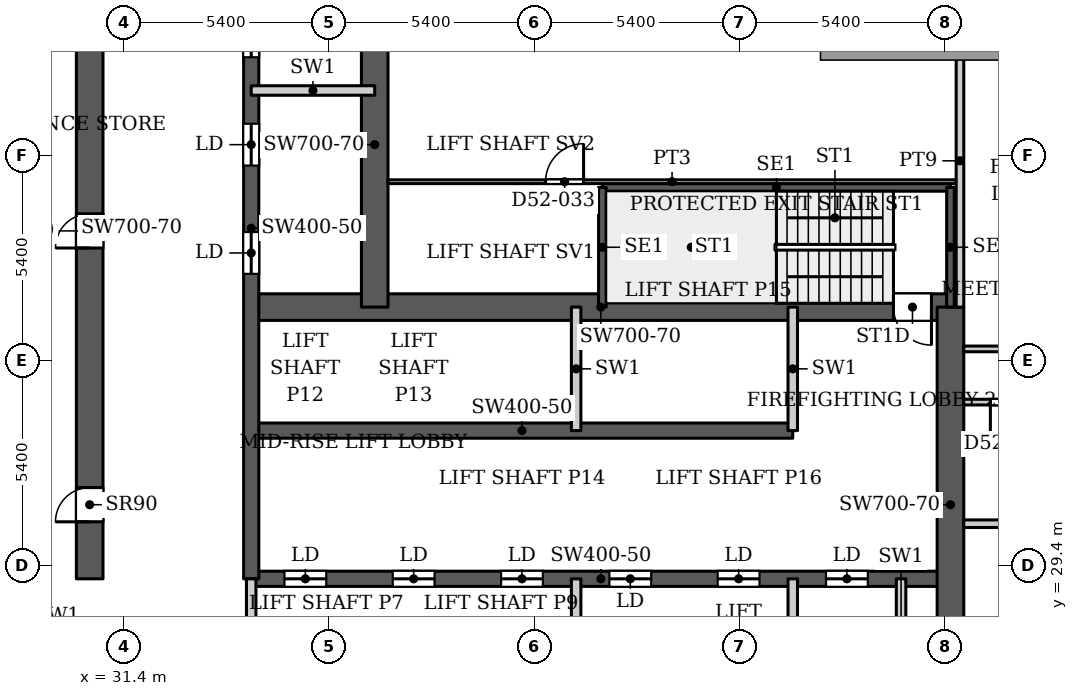
"""IFC4 building model, lengths in metres.
Left out: names, types, materials, properties, quantities, classifications, styles, units other than length and angle.
Written with IfcOpenShell. Run it as: python <this file> out.ifc"""

import sys

from ifc_helpers import new_model, si_unit, direction, frame, frame_2d, origin, place, context, subcontext, project, spatial, rectangle, extrude, source, transform, mapped, element, fill, save


model = new_model("IFC4")
c1 = context("Model", 3, precision=1e-05, world=origin(), true_north=direction((0.0, 1.0)))
c2 = subcontext(c1, "Body", "Model", "MODEL_VIEW")
j1 = project(units=[si_unit("LENGTHUNIT", "METRE"), si_unit("PLANEANGLEUNIT", "RADIAN")], contexts=[c1])
p1 = place(None, origin())
s1 = spatial("IfcSite", under=j1, at=p1, CompositionType="ELEMENT")
p2 = place(p1, origin())
s2 = spatial("IfcBuilding", under=s1, at=p2, CompositionType="ELEMENT")
p3 = place(p2, frame((0.0, 0.0, 227.9)))
s3 = spatial("IfcBuildingStorey", under=s2, at=p3, CompositionType="ELEMENT", Elevation=227.9)
p4 = place(p3, frame((34.75, 29.05, 0.0), z_axis=(0.0, 0.0, 1.0), x_axis=(1.0, 0.0, 0.0)))
e1 = element("IfcWall", 1, at=p4, inside=s3, PredefinedType="SHEAR", context=c2, shape_type="SweptSolid", body=[
    extrude(rectangle(XDim=18.4, YDim=0.4, at=frame_2d((9.2, 0.0))), origin(), (0.0, 0.0, 1.0), 3.9),
])
p5 = place(p4, frame((0.875, 0.0, 0.0)))
e2 = element("IfcOpeningElement", 2, at=p5, cuts=e1, PredefinedType="OPENING", context=c2, shape_type="SweptSolid", body=[
    extrude(rectangle(XDim=1.1, YDim=2.2, at=frame_2d((0.55, 1.1))), frame((0.0, 0.21, 0.0), z_axis=(0.0, -1.0, 0.0), x_axis=(1.0, 0.0, 0.0)), (0.0, 0.0, 1.0), 0.42),
])
p6 = place(p4, frame((3.725, 0.0, 0.0)))
e3 = element("IfcOpeningElement", 3, at=p6, cuts=e1, PredefinedType="OPENING", context=c2, shape_type="SweptSolid", body=[
    extrude(rectangle(XDim=1.1, YDim=2.2, at=frame_2d((0.55, 1.1))), frame((0.0, 0.21, 0.0), z_axis=(0.0, -1.0, 0.0), x_axis=(1.0, 0.0, 0.0)), (0.0, 0.0, 1.0), 0.42),
])
p7 = place(p4, frame((6.575, 0.0, 0.0)))
e4 = element("IfcOpeningElement", 4, at=p7, cuts=e1, PredefinedType="OPENING", context=c2, shape_type="SweptSolid", body=[
    extrude(rectangle(XDim=1.1, YDim=2.2, at=frame_2d((0.55, 1.1))), frame((0.0, 0.21, 0.0), z_axis=(0.0, -1.0, 0.0), x_axis=(1.0, 0.0, 0.0)), (0.0, 0.0, 1.0), 0.42),
])
p8 = place(p4, frame((9.425, 0.0, 0.0)))
e5 = element("IfcOpeningElement", 5, at=p8, cuts=e1, PredefinedType="OPENING", context=c2, shape_type="SweptSolid", body=[
    extrude(rectangle(XDim=1.1, YDim=2.2, at=frame_2d((0.55, 1.1))), frame((0.0, 0.21, 0.0), z_axis=(0.0, -1.0, 0.0), x_axis=(1.0, 0.0, 0.0)), (0.0, 0.0, 1.0), 0.42),
])
p9 = place(p4, frame((12.275, 0.0, 0.0)))
e6 = element("IfcOpeningElement", 6, at=p9, cuts=e1, PredefinedType="OPENING", context=c2, shape_type="SweptSolid", body=[
    extrude(rectangle(XDim=1.1, YDim=2.2, at=frame_2d((0.55, 1.1))), frame((0.0, 0.21, 0.0), z_axis=(0.0, -1.0, 0.0), x_axis=(1.0, 0.0, 0.0)), (0.0, 0.0, 1.0), 0.42),
])
p10 = place(p4, frame((15.125, 0.0, 0.0)))
e7 = element("IfcOpeningElement", 7, at=p10, cuts=e1, PredefinedType="OPENING", context=c2, shape_type="SweptSolid", body=[
    extrude(rectangle(XDim=1.1, YDim=2.2, at=frame_2d((0.55, 1.1))), frame((0.0, 0.21, 0.0), z_axis=(0.0, -1.0, 0.0), x_axis=(1.0, 0.0, 0.0)), (0.0, 0.0, 1.0), 0.42),
])
p11 = place(p3, frame((34.75, 32.95, 0.0), z_axis=(0.0, 0.0, 1.0), x_axis=(1.0, 0.0, 0.0)))
e8 = element("IfcWall", 8, at=p11, inside=s3, PredefinedType="SHEAR", context=c2, shape_type="SweptSolid", body=[
    extrude(rectangle(XDim=14.25, YDim=0.4, at=frame_2d((7.125, 0.0))), origin(), (0.0, 0.0, 1.0), 3.9),
])
p12 = place(p3, frame((34.75, 36.2, 0.0), z_axis=(0.0, 0.0, 1.0), x_axis=(1.0, 0.0, 0.0)))
e9 = element("IfcWall", 9, at=p12, inside=s3, PredefinedType="SHEAR", context=c2, shape_type="SweptSolid", body=[
    extrude(rectangle(XDim=18.4, YDim=0.7, at=frame_2d((9.2, 0.0))), origin(), (0.0, 0.0, 1.0), 3.9),
])
p13 = place(p12, frame((16.9, 0.0, 0.0)))
e10 = element("IfcOpeningElement", 10, at=p13, cuts=e9, PredefinedType="OPENING", context=c2, shape_type="SweptSolid", body=[
    extrude(rectangle(XDim=1.0, YDim=2.2, at=frame_2d((0.5, 1.1))), frame((0.0, 0.36, 0.0), z_axis=(0.0, -1.0, 0.0), x_axis=(1.0, 0.0, 0.0)), (0.0, 0.0, 1.0), 0.72),
])
p14 = place(p3, frame((34.75, 29.05, 0.0), z_axis=(0.0, 0.0, 1.0), x_axis=(0.0, 1.0, 0.0)))
e11 = element("IfcWall", 11, at=p14, inside=s3, PredefinedType="SHEAR", context=c2, shape_type="SweptSolid", body=[
    extrude(rectangle(XDim=18.45, YDim=0.4, at=frame_2d((9.225, 0.0))), origin(), (0.0, 0.0, 1.0), 3.9),
])
p15 = place(p14, frame((8.025, 0.0, 0.0)))
e12 = element("IfcOpeningElement", 12, at=p15, cuts=e11, PredefinedType="OPENING", context=c2, shape_type="SweptSolid", body=[
    extrude(rectangle(XDim=1.1, YDim=2.2, at=frame_2d((0.55, 1.1))), frame((0.0, 0.21, 0.0), z_axis=(0.0, -1.0, 0.0), x_axis=(1.0, 0.0, 0.0)), (0.0, 0.0, 1.0), 0.42),
])
p16 = place(p14, frame((10.875, 0.0, 0.0)))
e13 = element("IfcOpeningElement", 13, at=p16, cuts=e11, PredefinedType="OPENING", context=c2, shape_type="SweptSolid", body=[
    extrude(rectangle(XDim=1.1, YDim=2.2, at=frame_2d((0.55, 1.1))), frame((0.0, 0.21, 0.0), z_axis=(0.0, -1.0, 0.0), x_axis=(1.0, 0.0, 0.0)), (0.0, 0.0, 1.0), 0.42),
])
p17 = place(p14, frame((13.725, 0.0, 0.0)))
e14 = element("IfcOpeningElement", 14, at=p17, cuts=e11, PredefinedType="OPENING", context=c2, shape_type="SweptSolid", body=[
    extrude(rectangle(XDim=1.1, YDim=2.2, at=frame_2d((0.55, 1.1))), frame((0.0, 0.21, 0.0), z_axis=(0.0, -1.0, 0.0), x_axis=(1.0, 0.0, 0.0)), (0.0, 0.0, 1.0), 0.42),
])
p18 = place(p14, frame((15.95, 0.0, 0.0)))
e15 = element("IfcOpeningElement", 15, at=p18, cuts=e11, PredefinedType="OPENING", context=c2, shape_type="SweptSolid", body=[
    extrude(rectangle(XDim=1.1, YDim=2.2, at=frame_2d((0.55, 1.1))), frame((0.0, 0.21, 0.0), z_axis=(0.0, -1.0, 0.0), x_axis=(1.0, 0.0, 0.0)), (0.0, 0.0, 1.0), 0.42),
])
p19 = place(p3, frame((38.0, 36.2, 0.0), z_axis=(0.0, 0.0, 1.0), x_axis=(0.0, 1.0, 0.0)))
e16 = element("IfcWall", 16, at=p19, inside=s3, PredefinedType="SHEAR", context=c2, shape_type="SweptSolid", body=[
    extrude(rectangle(XDim=8.55, YDim=0.7, at=frame_2d((4.275, 0.0))), origin(), (0.0, 0.0, 1.0), 3.9),
])
p20 = place(p3, frame((30.5, 29.05, 0.0), z_axis=(0.0, 0.0, 1.0), x_axis=(0.0, 1.0, 0.0)))
e17 = element("IfcWall", 17, at=p20, inside=s3, PredefinedType="SHEAR", context=c2, shape_type="SweptSolid", body=[
    extrude(rectangle(XDim=18.45, YDim=0.7, at=frame_2d((9.225, 0.0))), origin(), (0.0, 0.0, 1.0), 3.9),
])
p21 = place(p20, frame((1.5, 0.0, 0.0)))
e18 = element("IfcOpeningElement", 18, at=p21, cuts=e17, PredefinedType="OPENING", context=c2, shape_type="SweptSolid", body=[
    extrude(rectangle(XDim=0.9, YDim=2.2, at=frame_2d((0.45, 1.1))), frame((0.0, 0.36, 0.0), z_axis=(0.0, -1.0, 0.0), x_axis=(1.0, 0.0, 0.0)), (0.0, 0.0, 1.0), 0.72),
])
p22 = place(p20, frame((8.705, 0.0, 0.0)))
e19 = element("IfcOpeningElement", 19, at=p22, cuts=e17, PredefinedType="OPENING", context=c2, shape_type="SweptSolid", body=[
    extrude(rectangle(XDim=0.9, YDim=2.2, at=frame_2d((0.45, 1.1))), frame((0.0, 0.36, 0.0), z_axis=(0.0, -1.0, 0.0), x_axis=(1.0, 0.0, 0.0)), (0.0, 0.0, 1.0), 0.72),
])
p23 = place(p3, frame((53.15, 25.8, 0.0), z_axis=(0.0, 0.0, 1.0), x_axis=(0.0, 1.0, 0.0)))
e20 = element("IfcWall", 20, at=p23, inside=s3, PredefinedType="SHEAR", context=c2, shape_type="SweptSolid", body=[
    extrude(rectangle(XDim=10.4, YDim=0.7, at=frame_2d((5.2, 0.0))), origin(), (0.0, 0.0, 1.0), 3.9),
])
p24 = place(p3, frame((29.712, 26.072, 0.0), z_axis=(0.0, 0.0, 1.0), x_axis=(-0.511028049012, 0.859564036662, 0.0)))
e21 = element("IfcWall", 21, at=p24, inside=s3, PredefinedType="SOLIDWALL", context=c2, shape_type="SweptSolid", body=[
    extrude(rectangle(XDim=4.634, YDim=0.25, at=frame_2d((2.317, 0.0))), origin(), (0.0, 0.0, 1.0), 3.217),
])
p25 = place(p3, frame((27.195, 31.969, 0.0), z_axis=(0.0, 0.0, 1.0), x_axis=(0.052555284099, 0.998618016117, 0.0)))
e22 = element("IfcWall", 22, at=p25, inside=s3, PredefinedType="SOLIDWALL", context=c2, shape_type="SweptSolid", body=[
    extrude(rectangle(XDim=61.38, YDim=0.25, at=frame_2d((30.69, 0.0))), origin(), (0.0, 0.0, 1.0), 3.75),
])
p26 = place(p3, frame((43.99, 39.35, 0.0), z_axis=(0.0, 0.0, 1.0), x_axis=(1.0, 0.0, 0.0)))
e23 = element("IfcWall", 23, at=p26, inside=s3, PredefinedType="SHEAR", context=c2, shape_type="SweptSolid", body=[
    extrude(rectangle(XDim=9.16, YDim=0.2, at=frame_2d((4.58, 0.0))), origin(), (0.0, 0.0, 1.0), 3.9),
])
for number, where, z_axis, x_axis in (
    (24, (43.99, 36.2, 0.0), (0.0, 0.0, 1.0), (0.0, 1.0, 0.0)),
    (25, (53.15, 36.2, 0.0), (0.0, 0.0, 1.0), (0.0, 1.0, 0.0)),
):
    element("IfcWall", number, at=place(p3, frame(where, z_axis=z_axis, x_axis=x_axis)), inside=s3, PredefinedType="SHEAR", context=c2, shape_type="SweptSolid", body=[
        extrude(rectangle(XDim=3.15, YDim=0.2, at=frame_2d((1.575, 0.0))), origin(), (0.0, 0.0, 1.0), 3.9),
    ])
for number, where, z_axis, x_axis in (
    (26, (34.75, 25.8, 0.0), (0.0, 0.0, 1.0), (0.0, 1.0, 0.0)),
    (27, (43.3, 25.8, 0.0), (0.0, 0.0, 1.0), (0.0, 1.0, 0.0)),
    (28, (43.3, 32.95, 0.0), (0.0, 0.0, 1.0), (0.0, 1.0, 0.0)),
    (29, (49.0, 25.8, 0.0), (0.0, 0.0, 1.0), (0.0, 1.0, 0.0)),
    (30, (49.0, 32.95, 0.0), (0.0, 0.0, 1.0), (0.0, 1.0, 0.0)),
    (31, (51.85, 25.8, 0.0), (0.0, 0.0, 1.0), (0.0, 1.0, 0.0)),
    (32, (34.75, 41.9, 0.0), (0.0, 0.0, 1.0), (1.0, 0.0, 0.0)),
):
    element("IfcWall", number, at=place(p3, frame(where, z_axis=z_axis, x_axis=x_axis)), inside=s3, PredefinedType="PARTITIONING", context=c2, shape_type="SweptSolid", body=[
        extrude(rectangle(XDim=3.25, YDim=0.25, at=frame_2d((1.625, 0.0))), origin(), (0.0, 0.0, 1.0), 3.9),
    ])
p27 = place(p3, frame((38.349, 39.5, 0.0), z_axis=(0.0, 0.0, 1.0), x_axis=(1.0, 0.0, 0.0)))
e33 = element("IfcWall", 33, at=p27, inside=s3, PredefinedType="PARTITIONING", context=c2, shape_type="SweptSolid", body=[
    extrude(rectangle(XDim=14.951, YDim=0.1, at=frame_2d((7.476, 0.0))), origin(), (0.0, 0.0, 1.0), 3.6),
])
p28 = place(p27, frame((4.147, 0.0, 0.0)))
e34 = element("IfcOpeningElement", 34, at=p28, cuts=e33, PredefinedType="OPENING", context=c2, shape_type="SweptSolid", body=[
    extrude(rectangle(XDim=1.0, YDim=2.1, at=frame_2d((0.5, 1.05))), frame((0.0, 0.06, 0.0), z_axis=(0.0, -1.0, 0.0), x_axis=(1.0, 0.0, 0.0)), (0.0, 0.0, 1.0), 0.12),
])
p29 = place(p3, frame((53.4, 36.199, 0.0), z_axis=(0.0, 0.0, 1.0), x_axis=(0.0, 1.0, 0.0)))
e35 = element("IfcWall", 35, at=p29, inside=s3, PredefinedType="PARTITIONING", context=c2, shape_type="SweptSolid", body=[
    extrude(rectangle(XDim=7.701, YDim=0.2, at=frame_2d((3.851, 0.0))), origin(), (0.0, 0.0, 1.0), 3.6),
])
p30 = place(p3, frame((53.499, 30.5, 0.0), z_axis=(0.0, 0.0, 1.0), x_axis=(1.0, 0.0, 0.0)))
e36 = element("IfcWall", 36, at=p30, inside=s3, PredefinedType="PARTITIONING", context=c2, shape_type="SweptSolid", body=[
    extrude(rectangle(XDim=28.401, YDim=0.2, at=frame_2d((14.2, 0.0))), origin(), (0.0, 0.0, 1.0), 3.6),
])
p31 = place(p30, frame((17.701, 0.0, 0.0)))
e37 = element("IfcOpeningElement", 37, at=p31, cuts=e36, PredefinedType="OPENING", context=c2, shape_type="SweptSolid", body=[
    extrude(rectangle(XDim=1.0, YDim=2.1, at=frame_2d((0.5, 1.05))), frame((0.0, 0.11, 0.0), z_axis=(0.0, -1.0, 0.0), x_axis=(1.0, 0.0, 0.0)), (0.0, 0.0, 1.0), 0.22),
])
p32 = place(p30, frame((24.301, 0.0, 0.0)))
e38 = element("IfcOpeningElement", 38, at=p32, cuts=e36, PredefinedType="OPENING", context=c2, shape_type="SweptSolid", body=[
    extrude(rectangle(XDim=1.0, YDim=2.1, at=frame_2d((0.5, 1.05))), frame((0.0, 0.11, 0.0), z_axis=(0.0, -1.0, 0.0), x_axis=(1.0, 0.0, 0.0)), (0.0, 0.0, 1.0), 0.22),
])
p33 = place(p3, frame((53.499, 33.7, 0.0), z_axis=(0.0, 0.0, 1.0), x_axis=(1.0, 0.0, 0.0)))
e39 = element("IfcWall", 39, at=p33, inside=s3, PredefinedType="PARTITIONING", context=c2, shape_type="SweptSolid", body=[
    extrude(rectangle(XDim=17.076, YDim=0.15, at=frame_2d((8.538, 0.0))), origin(), (0.0, 0.0, 1.0), 3.6),
])
p34 = place(p33, frame((10.151, 0.0, 0.0)))
e40 = element("IfcOpeningElement", 40, at=p34, cuts=e39, PredefinedType="OPENING", context=c2, shape_type="SweptSolid", body=[
    extrude(rectangle(XDim=0.8, YDim=2.1, at=frame_2d((0.4, 1.05))), frame((0.0, 0.085, 0.0), z_axis=(0.0, -1.0, 0.0), x_axis=(1.0, 0.0, 0.0)), (0.0, 0.0, 1.0), 0.17),
])
p35 = place(p33, frame((14.651, 0.0, 0.0)))
e41 = element("IfcOpeningElement", 41, at=p35, cuts=e39, PredefinedType="OPENING", context=c2, shape_type="SweptSolid", body=[
    extrude(rectangle(XDim=0.8, YDim=2.1, at=frame_2d((0.4, 1.05))), frame((0.0, 0.085, 0.0), z_axis=(0.0, -1.0, 0.0), x_axis=(1.0, 0.0, 0.0)), (0.0, 0.0, 1.0), 0.17),
])
p36 = place(p33, frame((7.451, 0.0, 0.0)))
e42 = element("IfcOpeningElement", 42, at=p36, cuts=e39, PredefinedType="OPENING", context=c2, shape_type="SweptSolid", body=[
    extrude(rectangle(XDim=0.8, YDim=2.1, at=frame_2d((0.4, 1.05))), frame((0.0, 0.085, 0.0), z_axis=(0.0, -1.0, 0.0), x_axis=(1.0, 0.0, 0.0)), (0.0, 0.0, 1.0), 0.17),
])
p37 = place(p33, frame((3.851, 0.0, 0.0)))
e43 = element("IfcOpeningElement", 43, at=p37, cuts=e39, PredefinedType="OPENING", context=c2, shape_type="SweptSolid", body=[
    extrude(rectangle(XDim=0.9, YDim=2.1, at=frame_2d((0.45, 1.05))), frame((0.0, 0.085, 0.0), z_axis=(0.0, -1.0, 0.0), x_axis=(1.0, 0.0, 0.0)), (0.0, 0.0, 1.0), 0.17),
])
p38 = place(p33, frame((0.701, 0.0, 0.0)))
e44 = element("IfcOpeningElement", 44, at=p38, cuts=e39, PredefinedType="OPENING", context=c2, shape_type="SweptSolid", body=[
    extrude(rectangle(XDim=0.8, YDim=2.1, at=frame_2d((0.4, 1.05))), frame((0.0, 0.085, 0.0), z_axis=(0.0, -1.0, 0.0), x_axis=(1.0, 0.0, 0.0)), (0.0, 0.0, 1.0), 0.17),
])
p39 = place(p33, frame((12.701, 0.0, 0.0)))
e45 = element("IfcOpeningElement", 45, at=p39, cuts=e39, PredefinedType="OPENING", context=c2, shape_type="SweptSolid", body=[
    extrude(rectangle(XDim=0.8, YDim=2.1, at=frame_2d((0.4, 1.05))), frame((0.0, 0.085, 0.0), z_axis=(0.0, -1.0, 0.0), x_axis=(1.0, 0.0, 0.0)), (0.0, 0.0, 1.0), 0.17),
])
p40 = place(p3, frame((53.499, 35.1, 0.0), z_axis=(0.0, 0.0, 1.0), x_axis=(1.0, 0.0, 0.0)))
e46 = element("IfcWall", 46, at=p40, inside=s3, PredefinedType="PARTITIONING", context=c2, shape_type="SweptSolid", body=[
    extrude(rectangle(XDim=19.901, YDim=0.15, at=frame_2d((9.95, 0.0))), origin(), (0.0, 0.0, 1.0), 3.6),
])
p41 = place(p40, frame((8.451, 0.0, 0.0)))
e47 = element("IfcOpeningElement", 47, at=p41, cuts=e46, PredefinedType="OPENING", context=c2, shape_type="SweptSolid", body=[
    extrude(rectangle(XDim=0.9, YDim=2.1, at=frame_2d((0.45, 1.05))), frame((0.0, 0.085, 0.0), z_axis=(0.0, -1.0, 0.0), x_axis=(1.0, 0.0, 0.0)), (0.0, 0.0, 1.0), 0.17),
])
p42 = place(p40, frame((11.601, 0.0, 0.0)))
e48 = element("IfcOpeningElement", 48, at=p42, cuts=e46, PredefinedType="OPENING", context=c2, shape_type="SweptSolid", body=[
    extrude(rectangle(XDim=0.9, YDim=2.1, at=frame_2d((0.45, 1.05))), frame((0.0, 0.085, 0.0), z_axis=(0.0, -1.0, 0.0), x_axis=(1.0, 0.0, 0.0)), (0.0, 0.0, 1.0), 0.17),
])
p43 = place(p40, frame((1.701, 0.0, 0.0)))
e49 = element("IfcOpeningElement", 49, at=p43, cuts=e46, PredefinedType="OPENING", context=c2, shape_type="SweptSolid", body=[
    extrude(rectangle(XDim=1.0, YDim=2.1, at=frame_2d((0.5, 1.05))), frame((0.0, 0.085, 0.0), z_axis=(0.0, -1.0, 0.0), x_axis=(1.0, 0.0, 0.0)), (0.0, 0.0, 1.0), 0.17),
])
p44 = place(p40, frame((4.801, 0.0, 0.0)))
e50 = element("IfcOpeningElement", 50, at=p44, cuts=e46, PredefinedType="OPENING", context=c2, shape_type="SweptSolid", body=[
    extrude(rectangle(XDim=1.6, YDim=2.1, at=frame_2d((0.8, 1.05))), frame((0.0, 0.085, 0.0), z_axis=(0.0, -1.0, 0.0), x_axis=(1.0, 0.0, 0.0)), (0.0, 0.0, 1.0), 0.17),
])
p45 = place(p40, frame((15.701, 0.0, 0.0)))
e51 = element("IfcOpeningElement", 51, at=p45, cuts=e46, PredefinedType="OPENING", context=c2, shape_type="SweptSolid", body=[
    extrude(rectangle(XDim=0.9, YDim=2.1, at=frame_2d((0.45, 1.05))), frame((0.0, 0.085, 0.0), z_axis=(0.0, -1.0, 0.0), x_axis=(1.0, 0.0, 0.0)), (0.0, 0.0, 1.0), 0.17),
])
m1 = source(origin(), c2, "Body", "SweptSolid", [
    extrude(rectangle(XDim=1.1, YDim=2.2, at=frame_2d((0.55, 1.1))), frame((0.0, 0.025, 0.0), z_axis=(0.0, -1.0, 0.0), x_axis=(1.0, 0.0, 0.0)), (0.0, 0.0, 1.0), 0.05),
])
p46 = place(p5, origin())
e52 = element("IfcDoor", 52, at=p46, inside=s3, OperationType="SLIDING_TO_LEFT", PredefinedType="DOOR", context=c2, shape_type="MappedRepresentation", body=[
    mapped(m1, transform((0.0, 0.0, 0.0), x_axis=(1.0, 0.0, 0.0), y_axis=(0.0, 1.0, 0.0), z_axis=(0.0, 0.0, 1.0), scale=1.0)),
])
fill(e2, e52)
p47 = place(p6, origin())
e53 = element("IfcDoor", 53, at=p47, inside=s3, OperationType="SLIDING_TO_LEFT", PredefinedType="DOOR", context=c2, shape_type="MappedRepresentation", body=[
    mapped(m1, transform((0.0, 0.0, 0.0), x_axis=(1.0, 0.0, 0.0), y_axis=(0.0, 1.0, 0.0), z_axis=(0.0, 0.0, 1.0), scale=1.0)),
])
fill(e3, e53)
p48 = place(p7, origin())
e54 = element("IfcDoor", 54, at=p48, inside=s3, OperationType="SLIDING_TO_LEFT", PredefinedType="DOOR", context=c2, shape_type="MappedRepresentation", body=[
    mapped(m1, transform((0.0, 0.0, 0.0), x_axis=(1.0, 0.0, 0.0), y_axis=(0.0, 1.0, 0.0), z_axis=(0.0, 0.0, 1.0), scale=1.0)),
])
fill(e4, e54)
p49 = place(p8, origin())
e55 = element("IfcDoor", 55, at=p49, inside=s3, OperationType="SLIDING_TO_LEFT", PredefinedType="DOOR", context=c2, shape_type="MappedRepresentation", body=[
    mapped(m1, transform((0.0, 0.0, 0.0), x_axis=(1.0, 0.0, 0.0), y_axis=(0.0, 1.0, 0.0), z_axis=(0.0, 0.0, 1.0), scale=1.0)),
])
fill(e5, e55)
p50 = place(p9, origin())
e56 = element("IfcDoor", 56, at=p50, inside=s3, OperationType="SLIDING_TO_LEFT", PredefinedType="DOOR", context=c2, shape_type="MappedRepresentation", body=[
    mapped(m1, transform((0.0, 0.0, 0.0), x_axis=(1.0, 0.0, 0.0), y_axis=(0.0, 1.0, 0.0), z_axis=(0.0, 0.0, 1.0), scale=1.0)),
])
fill(e6, e56)
p51 = place(p15, origin())
e57 = element("IfcDoor", 57, at=p51, inside=s3, OperationType="SLIDING_TO_LEFT", PredefinedType="DOOR", context=c2, shape_type="MappedRepresentation", body=[
    mapped(m1, transform((0.0, 0.0, 0.0), x_axis=(1.0, 0.0, 0.0), y_axis=(0.0, 1.0, 0.0), z_axis=(0.0, 0.0, 1.0), scale=1.0)),
])
fill(e12, e57)
p52 = place(p16, origin())
e58 = element("IfcDoor", 58, at=p52, inside=s3, OperationType="SLIDING_TO_LEFT", PredefinedType="DOOR", context=c2, shape_type="MappedRepresentation", body=[
    mapped(m1, transform((0.0, 0.0, 0.0), x_axis=(1.0, 0.0, 0.0), y_axis=(0.0, 1.0, 0.0), z_axis=(0.0, 0.0, 1.0), scale=1.0)),
])
fill(e13, e58)
p53 = place(p17, origin())
e59 = element("IfcDoor", 59, at=p53, inside=s3, OperationType="SLIDING_TO_LEFT", PredefinedType="DOOR", context=c2, shape_type="MappedRepresentation", body=[
    mapped(m1, transform((0.0, 0.0, 0.0), x_axis=(1.0, 0.0, 0.0), y_axis=(0.0, 1.0, 0.0), z_axis=(0.0, 0.0, 1.0), scale=1.0)),
])
fill(e14, e59)
p54 = place(p10, origin())
e60 = element("IfcDoor", 60, at=p54, inside=s3, OperationType="SLIDING_TO_LEFT", PredefinedType="DOOR", context=c2, shape_type="MappedRepresentation", body=[
    mapped(m1, transform((0.0, 0.0, 0.0), x_axis=(1.0, 0.0, 0.0), y_axis=(0.0, 1.0, 0.0), z_axis=(0.0, 0.0, 1.0), scale=1.0)),
])
fill(e7, e60)
m2 = source(origin(), c2, "Body", "SweptSolid", [
    extrude(rectangle(XDim=0.9, YDim=2.2, at=frame_2d((0.45, 1.1))), frame((0.0, 0.025, 0.0), z_axis=(0.0, -1.0, 0.0), x_axis=(1.0, 0.0, 0.0)), (0.0, 0.0, 1.0), 0.05),
])
p55 = place(p21, origin())
e61 = element("IfcDoor", 61, at=p55, inside=s3, OperationType="SINGLE_SWING_LEFT", PredefinedType="DOOR", context=c2, shape_type="MappedRepresentation", body=[
    mapped(m2, transform((0.0, 0.0, 0.0), x_axis=(1.0, 0.0, 0.0), y_axis=(0.0, 1.0, 0.0), z_axis=(0.0, 0.0, 1.0), scale=1.0)),
])
fill(e18, e61)
p56 = place(p22, origin())
e62 = element("IfcDoor", 62, at=p56, inside=s3, OperationType="SINGLE_SWING_LEFT", PredefinedType="DOOR", context=c2, shape_type="MappedRepresentation", body=[
    mapped(m2, transform((0.0, 0.0, 0.0), x_axis=(1.0, 0.0, 0.0), y_axis=(0.0, 1.0, 0.0), z_axis=(0.0, 0.0, 1.0), scale=1.0)),
])
fill(e19, e62)
m3 = source(origin(), c2, "Body", "SweptSolid", [
    extrude(rectangle(XDim=1.0, YDim=2.2, at=frame_2d((0.5, 1.1))), frame((0.0, 0.025, 0.0), z_axis=(0.0, -1.0, 0.0), x_axis=(1.0, 0.0, 0.0)), (0.0, 0.0, 1.0), 0.05),
])
p57 = place(p13, origin())
e63 = element("IfcDoor", 63, at=p57, inside=s3, OperationType="SINGLE_SWING_RIGHT", PredefinedType="DOOR", context=c2, shape_type="MappedRepresentation", body=[
    mapped(m3, transform((0.0, 0.0, 0.0), x_axis=(1.0, 0.0, 0.0), y_axis=(0.0, 1.0, 0.0), z_axis=(0.0, 0.0, 1.0), scale=1.0)),
])
fill(e10, e63)
m4 = source(origin(), c2, "Body", "SweptSolid", [
    extrude(rectangle(XDim=0.8, YDim=2.1, at=frame_2d((0.4, 1.05))), frame((0.0, 0.025, 0.0), z_axis=(0.0, -1.0, 0.0), x_axis=(1.0, 0.0, 0.0)), (0.0, 0.0, 1.0), 0.05),
])
p58 = place(p38, origin())
e64 = element("IfcDoor", 64, at=p58, inside=s3, OperationType="SINGLE_SWING_RIGHT", PredefinedType="DOOR", context=c2, shape_type="MappedRepresentation", body=[
    mapped(m4, transform((0.0, 0.0, 0.0), x_axis=(1.0, 0.0, 0.0), y_axis=(0.0, 1.0, 0.0), z_axis=(0.0, 0.0, 1.0), scale=1.0)),
])
fill(e44, e64)
m5 = source(origin(), c2, "Body", "SweptSolid", [
    extrude(rectangle(XDim=1.0, YDim=2.1, at=frame_2d((0.5, 1.05))), frame((0.0, 0.025, 0.0), z_axis=(0.0, -1.0, 0.0), x_axis=(1.0, 0.0, 0.0)), (0.0, 0.0, 1.0), 0.05),
])
p59 = place(p28, origin())
e65 = element("IfcDoor", 65, at=p59, inside=s3, OperationType="SINGLE_SWING_LEFT", PredefinedType="DOOR", context=c2, shape_type="MappedRepresentation", body=[
    mapped(m5, transform((0.0, 0.0, 0.0), x_axis=(1.0, 0.0, 0.0), y_axis=(0.0, 1.0, 0.0), z_axis=(0.0, 0.0, 1.0), scale=1.0)),
])
fill(e34, e65)
save(model, sys.argv[1])
